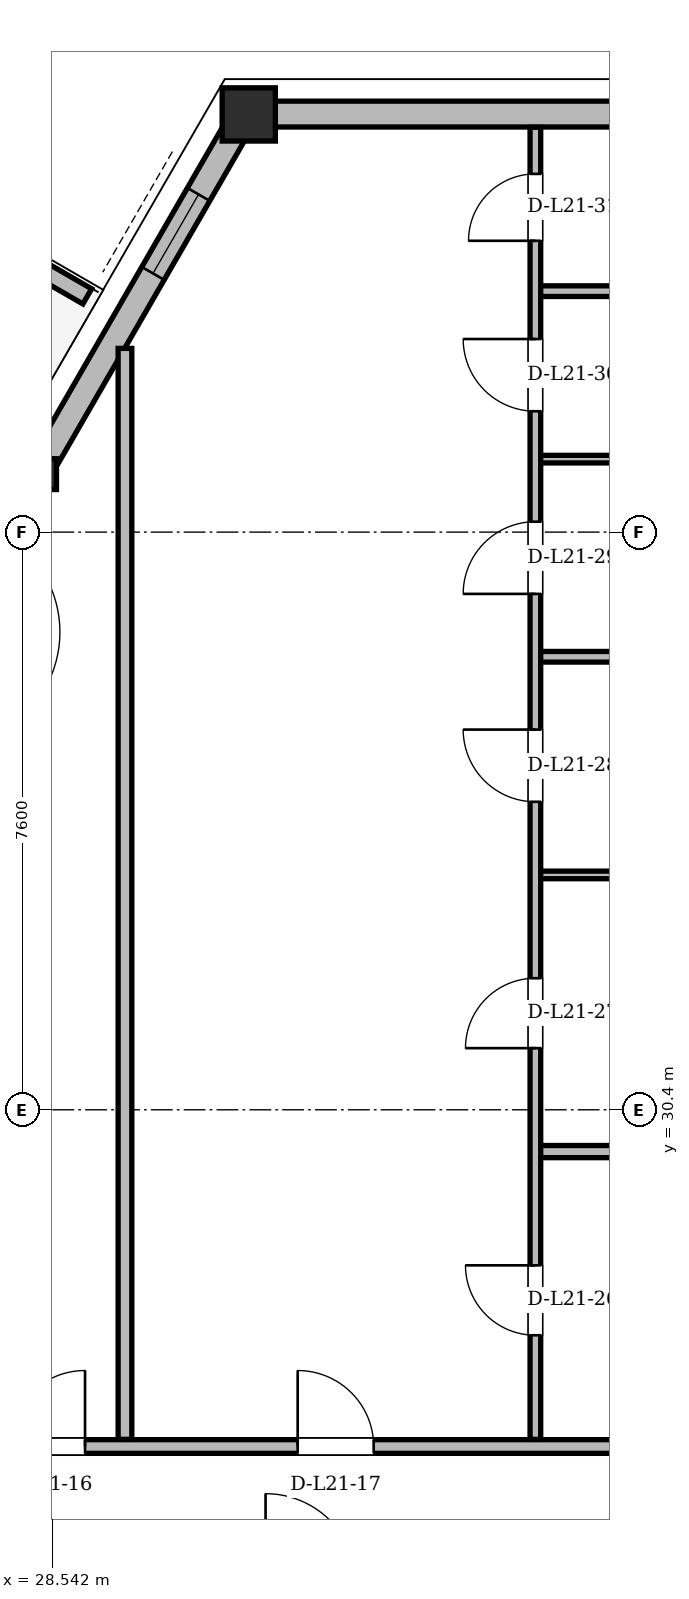
"""IFC4 building model, lengths in metres.
Left out: names, types, materials, properties, quantities, classifications, styles, units other than length and angle.
Written with IfcOpenShell. Run it as: python <this file> out.ifc"""

import sys

from ifc_helpers import new_model, si_unit, direction, frame, frame_2d, origin, origin_2d, place, context, subcontext, project, spatial, polyline, rectangle, hollow_rectangle, i_section, outline, extrude, element, fill, save


model = new_model("IFC4")
c1 = context("Model", 3, precision=1e-05, world=origin(), true_north=direction((0.0, 1.0)))
c2 = subcontext(c1, "Body", "Model", "MODEL_VIEW")
j1 = project(units=[si_unit("LENGTHUNIT", "METRE"), si_unit("PLANEANGLEUNIT", "RADIAN")], contexts=[c1])
p1 = place(None, origin())
s1 = spatial("IfcSite", under=j1, at=p1, CompositionType="ELEMENT")
p2 = place(p1, origin())
s2 = spatial("IfcBuilding", under=s1, at=p2, CompositionType="ELEMENT")
p3 = place(p2, frame((0.0, 0.0, 82.5)))
s3 = spatial("IfcBuildingStorey", under=s2, at=p3, CompositionType="ELEMENT", Elevation=82.5)
p4 = place(p3, frame((31.079, 43.5, 0.004), z_axis=(0.027795269096, -0.002582445539, 0.999610301063), x_axis=(0.092511107085, 0.995711652571, 0.0)))
e1 = element("IfcColumn", 1, at=p4, inside=s3, PredefinedType="COLUMN", context=c2, shape_type="SweptSolid", body=[
    extrude(hollow_rectangle(XDim=0.7, YDim=0.7, WallThickness=0.055, at=origin_2d()), origin(), (0.0, 0.0, 1.0), 3.593),
])
p5 = place(p3, frame((28.35, 38.773, 0.004), z_axis=(0.025961307385, -0.005776730701, 0.999646257384), x_axis=(0.2172010113, 0.976126897842, 0.0)))
e2 = element("IfcColumn", 2, at=p5, inside=s3, PredefinedType="COLUMN", context=c2, shape_type="SweptSolid", body=[
    extrude(i_section(OverallWidth=0.404, OverallDepth=0.406, WebThickness=0.027, FlangeThickness=0.044, at=origin_2d()), origin(), (0.0, 0.0, 1.0), 3.592),
])
p6 = place(p3, frame((43.921, 43.5, 0.0), z_axis=(0.0, 0.0, 1.0), x_axis=(-1.0, 0.0, 0.0)))
e3 = element("IfcWall", 3, at=p6, inside=s3, PredefinedType="SOLIDWALL", context=c2, shape_type="SweptSolid", body=[
    extrude(rectangle(XDim=12.842, YDim=0.34, at=frame_2d((6.421, 0.0))), origin(), (0.0, 0.0, 1.0), 2.578),
])
p7 = place(p6, frame((3.708, 0.0, 0.85)))
e4 = element("IfcOpeningElement", 4, at=p7, cuts=e3, PredefinedType="OPENING", context=c2, shape_type="SweptSolid", body=[
    extrude(rectangle(XDim=1.2, YDim=1.48, at=frame_2d((0.6, 0.74))), frame((0.0, 0.17, 0.0), z_axis=(0.0, -1.0, 0.0), x_axis=(1.0, 0.0, 0.0)), (0.0, 0.0, 1.0), 0.34),
])
p8 = place(p3, frame((31.079, 43.5, 0.0), z_axis=(0.0, 0.0, 1.0), x_axis=(-0.499998999238, -0.866025981574, 0.0)))
e5 = element("IfcWall", 5, at=p8, inside=s3, PredefinedType="SOLIDWALL", context=c2, shape_type="SweptSolid", body=[
    extrude(rectangle(XDim=34.108, YDim=0.34, at=frame_2d((17.054, 0.0))), origin(), (0.0, 0.0, 1.0), 2.578),
])
p9 = place(p8, frame((6.369, 0.0, 0.0)))
e6 = element("IfcOpeningElement", 6, at=p9, cuts=e5, PredefinedType="OPENING", context=c2, shape_type="SweptSolid", body=[
    extrude(rectangle(XDim=1.5, YDim=2.2, at=frame_2d((0.75, 1.1))), frame((0.0, 0.17, 0.0), z_axis=(0.0, -1.0, 0.0), x_axis=(1.0, 0.0, 0.0)), (0.0, 0.0, 1.0), 0.34),
])
p10 = place(p8, frame((26.044, 0.0, 0.0)))
e7 = element("IfcOpeningElement", 7, at=p10, cuts=e5, PredefinedType="OPENING", context=c2, shape_type="SweptSolid", body=[
    extrude(rectangle(XDim=1.5, YDim=2.2, at=frame_2d((0.75, 1.1))), frame((0.0, 0.17, 0.0), z_axis=(0.0, -1.0, 0.0), x_axis=(1.0, 0.0, 0.0)), (0.0, 0.0, 1.0), 0.34),
])
p11 = place(p8, frame((31.989, 0.0, 0.85)))
e8 = element("IfcOpeningElement", 8, at=p11, cuts=e5, PredefinedType="OPENING", context=c2, shape_type="SweptSolid", body=[
    extrude(rectangle(XDim=1.2, YDim=1.48, at=frame_2d((0.6, 0.74))), frame((0.0, 0.17, 0.0), z_axis=(0.0, -1.0, 0.0), x_axis=(1.0, 0.0, 0.0)), (0.0, 0.0, 1.0), 0.34),
])
p12 = place(p8, frame((29.607, 0.0, 0.85)))
e9 = element("IfcOpeningElement", 9, at=p12, cuts=e5, PredefinedType="OPENING", context=c2, shape_type="SweptSolid", body=[
    extrude(rectangle(XDim=1.2, YDim=1.48, at=frame_2d((0.6, 0.74))), frame((0.0, 0.17, 0.0), z_axis=(0.0, -1.0, 0.0), x_axis=(1.0, 0.0, 0.0)), (0.0, 0.0, 1.0), 0.34),
])
p13 = place(p8, frame((11.736, 0.0, 0.85)))
e10 = element("IfcOpeningElement", 10, at=p13, cuts=e5, PredefinedType="OPENING", context=c2, shape_type="SweptSolid", body=[
    extrude(rectangle(XDim=1.2, YDim=1.48, at=frame_2d((0.6, 0.74))), frame((0.0, 0.17, 0.0), z_axis=(0.0, -1.0, 0.0), x_axis=(1.0, 0.0, 0.0)), (0.0, 0.0, 1.0), 0.34),
])
p14 = place(p8, frame((14.635, 0.0, 0.85)))
e11 = element("IfcOpeningElement", 11, at=p14, cuts=e5, PredefinedType="OPENING", context=c2, shape_type="SweptSolid", body=[
    extrude(rectangle(XDim=1.2, YDim=1.48, at=frame_2d((0.6, 0.74))), frame((0.0, 0.17, 0.0), z_axis=(0.0, -1.0, 0.0), x_axis=(1.0, 0.0, 0.0)), (0.0, 0.0, 1.0), 0.34),
])
p15 = place(p8, frame((17.248, 0.0, 0.85)))
e12 = element("IfcOpeningElement", 12, at=p15, cuts=e5, PredefinedType="OPENING", context=c2, shape_type="SweptSolid", body=[
    extrude(rectangle(XDim=1.2, YDim=1.48, at=frame_2d((0.6, 0.74))), frame((0.0, 0.17, 0.0), z_axis=(0.0, -1.0, 0.0), x_axis=(1.0, 0.0, 0.0)), (0.0, 0.0, 1.0), 0.34),
])
p16 = place(p8, frame((1.22, 0.0, 0.85)))
e13 = element("IfcOpeningElement", 13, at=p16, cuts=e5, PredefinedType="OPENING", context=c2, shape_type="SweptSolid", body=[
    extrude(rectangle(XDim=1.2, YDim=1.48, at=frame_2d((0.6, 0.74))), frame((0.0, 0.17, 0.0), z_axis=(0.0, -1.0, 0.0), x_axis=(1.0, 0.0, 0.0)), (0.0, 0.0, 1.0), 0.34),
])
p17 = place(p3, frame((29.004, 41.102, 0.0), z_axis=(0.0, 0.0, 1.0), x_axis=(-0.866042246008, 0.499970827278, 0.0)))
e14 = element("IfcWall", 14, at=p17, inside=s3, PredefinedType="PARAPET", context=c2, shape_type="SweptSolid", body=[
    extrude(outline(polyline([(0.0, 0.0), (2.042, 0.0), (2.042, 1.1), (0.0, 1.32), (0.0, 0.0)])), frame((0.0, 0.115, 0.0), z_axis=(0.0, -1.0, 0.0), x_axis=(1.0, 0.0, 0.0)), (0.0, 0.0, 1.0), 0.23),
])
p18 = place(p3, frame((27.55, 25.97, 0.0), z_axis=(0.0, 0.0, 1.0), x_axis=(1.0, 0.0, 0.0)))
e15 = element("IfcWall", 15, at=p18, inside=s3, PredefinedType="PARTITIONING", context=c2, shape_type="SweptSolid", body=[
    extrude(rectangle(XDim=19.9, YDim=0.18, at=frame_2d((9.95, 0.0))), origin(), (0.0, 0.0, 1.0), 2.814),
])
p19 = place(p18, frame((0.425, 0.0, 0.0)))
e16 = element("IfcOpeningElement", 16, at=p19, cuts=e15, PredefinedType="OPENING", context=c2, shape_type="SweptSolid", body=[
    extrude(rectangle(XDim=1.0, YDim=2.18, at=frame_2d((0.5, 1.09))), frame((0.0, 0.09, 0.0), z_axis=(0.0, -1.0, 0.0), x_axis=(1.0, 0.0, 0.0)), (0.0, 0.0, 1.0), 0.18),
])
p20 = place(p18, frame((4.222, 0.0, 0.0)))
e17 = element("IfcOpeningElement", 17, at=p20, cuts=e15, PredefinedType="OPENING", context=c2, shape_type="SweptSolid", body=[
    extrude(rectangle(XDim=1.0, YDim=2.18, at=frame_2d((0.5, 1.09))), frame((0.0, 0.09, 0.0), z_axis=(0.0, -1.0, 0.0), x_axis=(1.0, 0.0, 0.0)), (0.0, 0.0, 1.0), 0.18),
])
p21 = place(p18, frame((13.4, 0.0, 0.0)))
e18 = element("IfcOpeningElement", 18, at=p21, cuts=e15, PredefinedType="OPENING", context=c2, shape_type="SweptSolid", body=[
    extrude(rectangle(XDim=1.3, YDim=2.2, at=frame_2d((0.65, 1.1))), frame((0.0, 0.09, 0.0), z_axis=(0.0, -1.0, 0.0), x_axis=(1.0, 0.0, 0.0)), (0.0, 0.0, 1.0), 0.18),
])
p22 = place(p18, frame((16.95, 0.0, 0.0)))
e19 = element("IfcOpeningElement", 19, at=p22, cuts=e15, PredefinedType="OPENING", context=c2, shape_type="SweptSolid", body=[
    extrude(rectangle(XDim=1.0, YDim=2.18, at=frame_2d((0.5, 1.09))), frame((0.0, 0.09, 0.0), z_axis=(0.0, -1.0, 0.0), x_axis=(1.0, 0.0, 0.0)), (0.0, 0.0, 1.0), 0.18),
])
p23 = place(p3, frame((34.9, 29.85, 0.0), z_axis=(0.0, 0.0, 1.0), x_axis=(1.0, 0.0, 0.0)))
e20 = element("IfcWall", 20, at=p23, inside=s3, PredefinedType="PARTITIONING", context=c2, shape_type="SweptSolid", body=[
    extrude(rectangle(XDim=3.15, YDim=0.16, at=frame_2d((1.575, 0.0))), origin(), (0.0, 0.0, 1.0), 3.36),
])
p24 = place(p3, frame((34.9, 33.49, 0.0), z_axis=(0.0, 0.0, 1.0), x_axis=(1.0, 0.0, 0.0)))
e21 = element("IfcWall", 21, at=p24, inside=s3, PredefinedType="PARTITIONING", context=c2, shape_type="SweptSolid", body=[
    extrude(rectangle(XDim=3.15, YDim=0.1, at=frame_2d((1.575, 0.0))), origin(), (0.0, 0.0, 1.0), 3.36),
])
p25 = place(p3, frame((34.9, 36.36, 0.0), z_axis=(0.0, 0.0, 1.0), x_axis=(1.0, 0.0, 0.0)))
e22 = element("IfcWall", 22, at=p25, inside=s3, PredefinedType="PARTITIONING", context=c2, shape_type="SweptSolid", body=[
    extrude(rectangle(XDim=3.15, YDim=0.14, at=frame_2d((1.575, 0.0))), origin(), (0.0, 0.0, 1.0), 3.36),
])
p26 = place(p3, frame((34.9, 38.96, 0.0), z_axis=(0.0, 0.0, 1.0), x_axis=(1.0, 0.0, 0.0)))
e23 = element("IfcWall", 23, at=p26, inside=s3, PredefinedType="PARTITIONING", context=c2, shape_type="SweptSolid", body=[
    extrude(rectangle(XDim=3.15, YDim=0.1, at=frame_2d((1.575, 0.0))), origin(), (0.0, 0.0, 1.0), 3.36),
])
p27 = place(p3, frame((34.9, 41.17, 0.0), z_axis=(0.0, 0.0, 1.0), x_axis=(1.0, 0.0, 0.0)))
e24 = element("IfcWall", 24, at=p27, inside=s3, PredefinedType="PARTITIONING", context=c2, shape_type="SweptSolid", body=[
    extrude(rectangle(XDim=3.15, YDim=0.14, at=frame_2d((1.575, 0.0))), origin(), (0.0, 0.0, 1.0), 3.36),
])
p28 = place(p3, frame((29.5, 26.064, 0.0), z_axis=(0.0, 0.0, 1.0), x_axis=(0.0, 1.0, 0.0)))
e25 = element("IfcWall", 25, at=p28, inside=s3, PredefinedType="PARTITIONING", context=c2, shape_type="SweptSolid", body=[
    extrude(rectangle(XDim=14.353, YDim=0.18, at=frame_2d((7.177, 0.0))), origin(), (0.0, 0.0, 1.0), 2.578),
])
p29 = place(p3, frame((34.9, 26.064, 0.0), z_axis=(0.0, 0.0, 1.0), x_axis=(0.0, 1.0, 0.0)))
e26 = element("IfcWall", 26, at=p29, inside=s3, PredefinedType="PARTITIONING", context=c2, shape_type="SweptSolid", body=[
    extrude(rectangle(XDim=17.262, YDim=0.14, at=frame_2d((8.631, 0.0))), origin(), (0.0, 0.0, 1.0), 3.36),
])
p30 = place(p29, frame((1.37, 0.0, 0.0)))
e27 = element("IfcOpeningElement", 27, at=p30, cuts=e26, PredefinedType="OPENING", context=c2, shape_type="SweptSolid", body=[
    extrude(rectangle(XDim=0.92, YDim=2.12, at=frame_2d((0.46, 1.06))), frame((0.0, 0.07, 0.0), z_axis=(0.0, -1.0, 0.0), x_axis=(1.0, 0.0, 0.0)), (0.0, 0.0, 1.0), 0.14),
])
p31 = place(p29, frame((5.147, 0.0, 0.0)))
e28 = element("IfcOpeningElement", 28, at=p31, cuts=e26, PredefinedType="OPENING", context=c2, shape_type="SweptSolid", body=[
    extrude(rectangle(XDim=0.92, YDim=2.12, at=frame_2d((0.46, 1.06))), frame((0.0, 0.07, 0.0), z_axis=(0.0, -1.0, 0.0), x_axis=(1.0, 0.0, 0.0)), (0.0, 0.0, 1.0), 0.14),
])
p32 = place(p29, frame((8.388, 0.0, 0.0)))
e29 = element("IfcOpeningElement", 29, at=p32, cuts=e26, PredefinedType="OPENING", context=c2, shape_type="SweptSolid", body=[
    extrude(rectangle(XDim=0.95, YDim=2.1, at=frame_2d((0.475, 1.05))), frame((0.0, 0.07, 0.0), z_axis=(0.0, -1.0, 0.0), x_axis=(1.0, 0.0, 0.0)), (0.0, 0.0, 1.0), 0.14),
])
p33 = place(p29, frame((11.123, 0.0, 0.0)))
e30 = element("IfcOpeningElement", 30, at=p33, cuts=e26, PredefinedType="OPENING", context=c2, shape_type="SweptSolid", body=[
    extrude(rectangle(XDim=0.95, YDim=2.1, at=frame_2d((0.475, 1.05))), frame((0.0, 0.07, 0.0), z_axis=(0.0, -1.0, 0.0), x_axis=(1.0, 0.0, 0.0)), (0.0, 0.0, 1.0), 0.14),
])
p34 = place(p29, frame((13.526, 0.0, 0.0)))
e31 = element("IfcOpeningElement", 31, at=p34, cuts=e26, PredefinedType="OPENING", context=c2, shape_type="SweptSolid", body=[
    extrude(rectangle(XDim=0.95, YDim=2.1, at=frame_2d((0.475, 1.05))), frame((0.0, 0.07, 0.0), z_axis=(0.0, -1.0, 0.0), x_axis=(1.0, 0.0, 0.0)), (0.0, 0.0, 1.0), 0.14),
])
p35 = place(p29, frame((15.769, 0.0, 0.0)))
e32 = element("IfcOpeningElement", 32, at=p35, cuts=e26, PredefinedType="OPENING", context=c2, shape_type="SweptSolid", body=[
    extrude(rectangle(XDim=0.88, YDim=2.08, at=frame_2d((0.44, 1.04))), frame((0.0, 0.07, 0.0), z_axis=(0.0, -1.0, 0.0), x_axis=(1.0, 0.0, 0.0)), (0.0, 0.0, 1.0), 0.14),
])
p36 = place(p16, origin())
e33 = element("IfcWindow", 33, at=p36, inside=s3, PartitioningType="SINGLE_PANEL", PredefinedType="WINDOW", context=c2, shape_type="SweptSolid", body=[
    extrude(rectangle(XDim=1.2, YDim=1.48, at=frame_2d((0.6, 0.74))), frame((0.0, 0.03, 0.0), z_axis=(0.0, -1.0, 0.0), x_axis=(1.0, 0.0, 0.0)), (0.0, 0.0, 1.0), 0.06),
])
fill(e13, e33)
p37 = place(p19, origin())
e34 = element("IfcDoor", 34, at=p37, inside=s3, OperationType="SINGLE_SWING_RIGHT", PredefinedType="DOOR", context=c2, shape_type="SweptSolid", body=[
    extrude(rectangle(XDim=1.0, YDim=2.18, at=frame_2d((0.5, 1.09))), frame((0.0, 0.025, 0.0), z_axis=(0.0, -1.0, 0.0), x_axis=(1.0, 0.0, 0.0)), (0.0, 0.0, 1.0), 0.05),
])
fill(e16, e34)
p38 = place(p20, origin())
e35 = element("IfcDoor", 35, at=p38, inside=s3, OperationType="SINGLE_SWING_LEFT", PredefinedType="DOOR", context=c2, shape_type="SweptSolid", body=[
    extrude(rectangle(XDim=1.0, YDim=2.18, at=frame_2d((0.5, 1.09))), frame((0.0, 0.025, 0.0), z_axis=(0.0, -1.0, 0.0), x_axis=(1.0, 0.0, 0.0)), (0.0, 0.0, 1.0), 0.05),
])
fill(e17, e35)
p39 = place(p30, origin())
e36 = element("IfcDoor", 36, at=p39, inside=s3, OperationType="SINGLE_SWING_RIGHT", PredefinedType="DOOR", context=c2, shape_type="SweptSolid", body=[
    extrude(rectangle(XDim=0.92, YDim=2.12, at=frame_2d((0.46, 1.06))), frame((0.0, 0.025, 0.0), z_axis=(0.0, -1.0, 0.0), x_axis=(1.0, 0.0, 0.0)), (0.0, 0.0, 1.0), 0.05),
])
fill(e27, e36)
p40 = place(p31, origin())
e37 = element("IfcDoor", 37, at=p40, inside=s3, OperationType="SINGLE_SWING_LEFT", PredefinedType="DOOR", context=c2, shape_type="SweptSolid", body=[
    extrude(rectangle(XDim=0.92, YDim=2.12, at=frame_2d((0.46, 1.06))), frame((0.0, 0.025, 0.0), z_axis=(0.0, -1.0, 0.0), x_axis=(1.0, 0.0, 0.0)), (0.0, 0.0, 1.0), 0.05),
])
fill(e28, e37)
p41 = place(p32, origin())
e38 = element("IfcDoor", 38, at=p41, inside=s3, OperationType="SINGLE_SWING_RIGHT", PredefinedType="DOOR", context=c2, shape_type="SweptSolid", body=[
    extrude(rectangle(XDim=0.95, YDim=2.1, at=frame_2d((0.475, 1.05))), frame((0.0, 0.025, 0.0), z_axis=(0.0, -1.0, 0.0), x_axis=(1.0, 0.0, 0.0)), (0.0, 0.0, 1.0), 0.05),
])
fill(e29, e38)
p42 = place(p33, origin())
e39 = element("IfcDoor", 39, at=p42, inside=s3, OperationType="SINGLE_SWING_LEFT", PredefinedType="DOOR", context=c2, shape_type="SweptSolid", body=[
    extrude(rectangle(XDim=0.95, YDim=2.1, at=frame_2d((0.475, 1.05))), frame((0.0, 0.025, 0.0), z_axis=(0.0, -1.0, 0.0), x_axis=(1.0, 0.0, 0.0)), (0.0, 0.0, 1.0), 0.05),
])
fill(e30, e39)
p43 = place(p34, origin())
e40 = element("IfcDoor", 40, at=p43, inside=s3, OperationType="SINGLE_SWING_RIGHT", PredefinedType="DOOR", context=c2, shape_type="SweptSolid", body=[
    extrude(rectangle(XDim=0.95, YDim=2.1, at=frame_2d((0.475, 1.05))), frame((0.0, 0.025, 0.0), z_axis=(0.0, -1.0, 0.0), x_axis=(1.0, 0.0, 0.0)), (0.0, 0.0, 1.0), 0.05),
])
fill(e31, e40)
p44 = place(p35, origin())
e41 = element("IfcDoor", 41, at=p44, inside=s3, OperationType="SINGLE_SWING_LEFT", PredefinedType="DOOR", context=c2, shape_type="SweptSolid", body=[
    extrude(rectangle(XDim=0.88, YDim=2.08, at=frame_2d((0.44, 1.04))), frame((0.0, 0.025, 0.0), z_axis=(0.0, -1.0, 0.0), x_axis=(1.0, 0.0, 0.0)), (0.0, 0.0, 1.0), 0.05),
])
fill(e32, e41)
save(model, sys.argv[1])
